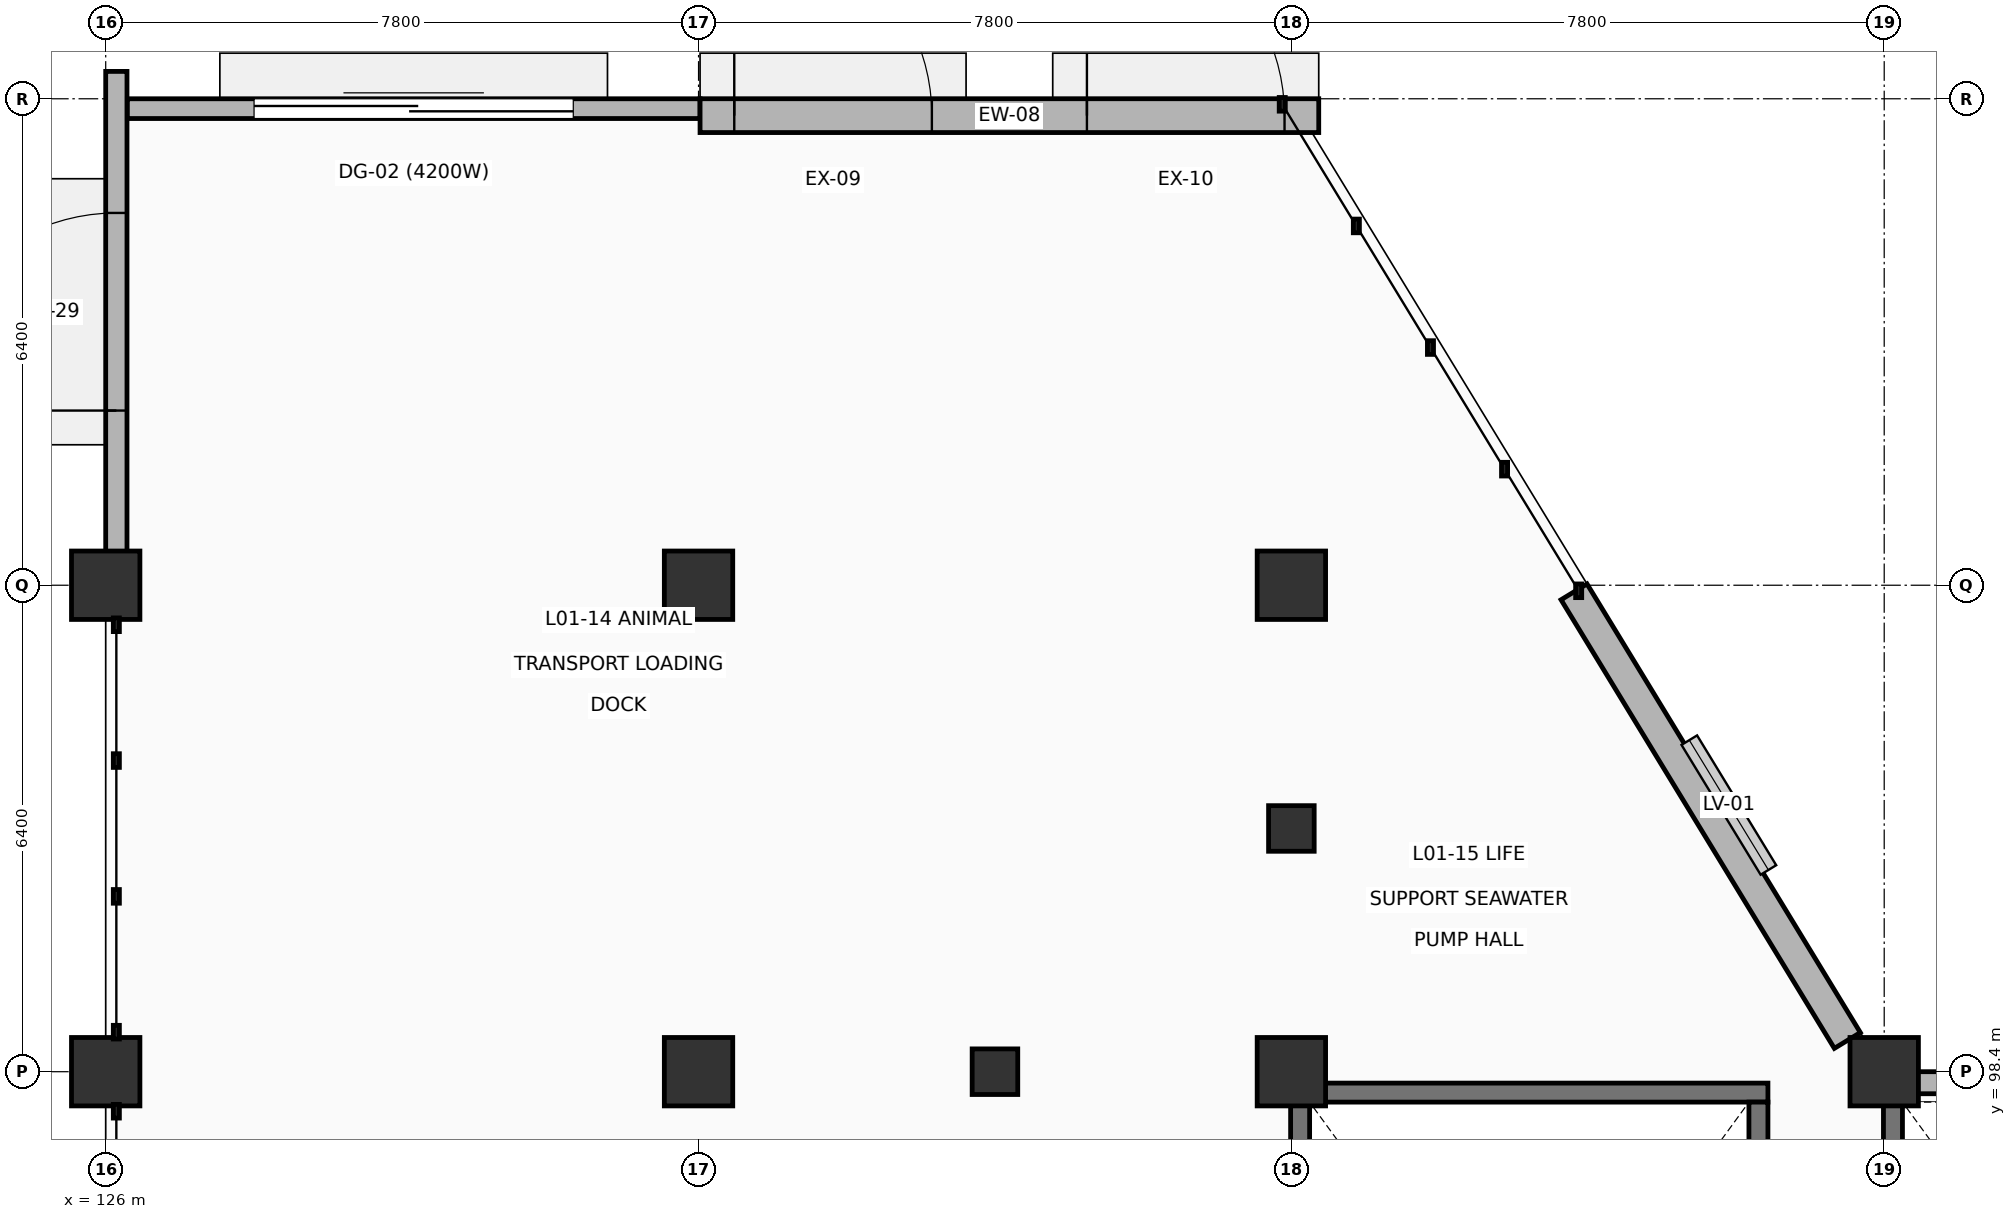
"""IFC4 building model, lengths in metres.
Left out: names, types, materials, properties, quantities, classifications, styles, units other than length and angle.
Written with IfcOpenShell. Run it as: python <this file> out.ifc"""

import sys

from ifc_helpers import new_model, si_unit, direction, frame, frame_2d, origin, origin_2d, place, context, subcontext, project, spatial, rectangle, extrude, element, fill, save


model = new_model("IFC4")
c1 = context("Model", 3, precision=1e-05, world=origin(), true_north=direction((0.0, 1.0)))
c2 = subcontext(c1, "Body", "Model", "MODEL_VIEW")
j1 = project(units=[si_unit("LENGTHUNIT", "METRE"), si_unit("PLANEANGLEUNIT", "RADIAN")], contexts=[c1])
p1 = place(None, origin())
s1 = spatial("IfcSite", under=j1, at=p1, CompositionType="ELEMENT")
p2 = place(p1, origin())
s2 = spatial("IfcBuilding", under=s1, at=p2, CompositionType="ELEMENT")
p3 = place(p2, origin())
s3 = spatial("IfcBuildingStorey", under=s2, at=p3, CompositionType="ELEMENT", Elevation=0.0)
for number, where, z_axis, x_axis in (
    (1, (126.0, 98.4, 0.0), (0.0, 0.0, 1.0), (1.0, 0.0, 0.0)),
    (2, (126.0, 104.8, 0.0), (0.0, 0.0, 1.0), (1.0, 0.0, 0.0)),
):
    element("IfcColumn", number, at=place(p3, frame(where, z_axis=z_axis, x_axis=x_axis)), inside=s3, PredefinedType="COLUMN", context=c2, shape_type="SweptSolid", body=[
        extrude(rectangle(XDim=0.9, YDim=0.9, at=origin_2d()), origin(), (0.0, 0.0, 1.0), 5.1),
    ])
for number, where, z_axis, x_axis in (
    (3, (133.8, 98.4, 0.0), (0.0, 0.0, 1.0), (1.0, 0.0, 0.0)),
    (4, (133.8, 104.8, 0.0), (0.0, 0.0, 1.0), (1.0, 0.0, 0.0)),
    (5, (141.6, 98.4, 0.0), (0.0, 0.0, 1.0), (1.0, 0.0, 0.0)),
    (6, (141.6, 104.8, 0.0), (0.0, 0.0, 1.0), (1.0, 0.0, 0.0)),
    (7, (149.4, 98.4, 0.0), (0.0, 0.0, 1.0), (1.0, 0.0, 0.0)),
):
    element("IfcColumn", number, at=place(p3, frame(where, z_axis=z_axis, x_axis=x_axis)), inside=s3, PredefinedType="COLUMN", context=c2, shape_type="SweptSolid", body=[
        extrude(rectangle(XDim=0.9, YDim=0.9, at=origin_2d()), origin(), (0.0, 0.0, 1.0), 5.4),
    ])
for number, where, z_axis, x_axis in (
    (8, (137.7, 98.4, 0.0), (0.0, 0.0, 1.0), (1.0, 0.0, 0.0)),
    (9, (141.6, 101.6, 0.0), (0.0, 0.0, 1.0), (1.0, 0.0, 0.0)),
):
    element("IfcColumn", number, at=place(p3, frame(where, z_axis=z_axis, x_axis=x_axis)), inside=s3, PredefinedType="COLUMN", context=c2, shape_type="SweptSolid", body=[
        extrude(rectangle(XDim=0.6, YDim=0.6, at=origin_2d()), origin(), (0.0, 0.0, 1.0), 5.4),
    ])
p4 = place(p3, frame((149.835, 98.255, 0.0), z_axis=(0.0, 0.0, 1.0), x_axis=(1.0, 0.0, 0.0)))
e10 = element("IfcWall", 10, at=p4, inside=s3, PredefinedType="SOLIDWALL", context=c2, shape_type="SweptSolid", body=[
    extrude(rectangle(XDim=6.93, YDim=0.29, at=frame_2d((3.465, 0.0))), origin(), (0.0, 0.0, 1.0), 4.325),
])
p5 = place(p3, frame((126.14, 105.235, 0.0), z_axis=(0.0, 0.0, 1.0), x_axis=(0.0, 1.0, 0.0)))
e11 = element("IfcWall", 11, at=p5, inside=s3, PredefinedType="SOLIDWALL", context=c2, shape_type="SweptSolid", body=[
    extrude(rectangle(XDim=6.325, YDim=0.28, at=frame_2d((3.163, 0.0))), origin(), (0.0, 0.0, 1.0), 5.16),
])
p6 = place(p5, frame((1.863, 0.0, 0.0)))
e12 = element("IfcOpeningElement", 12, at=p6, cuts=e11, PredefinedType="OPENING", context=c2, shape_type="SweptSolid", body=[
    extrude(rectangle(XDim=2.6, YDim=2.6, at=frame_2d((1.3, 1.3))), frame((0.0, 0.15, 0.0), z_axis=(0.0, -1.0, 0.0), x_axis=(1.0, 0.0, 0.0)), (0.0, 0.0, 1.0), 0.3),
])
p7 = place(p3, frame((126.285, 111.07, 0.0), z_axis=(0.0, 0.0, 1.0), x_axis=(1.0, 0.0, 0.0)))
e13 = element("IfcWall", 13, at=p7, inside=s3, PredefinedType="SOLIDWALL", context=c2, shape_type="SweptSolid", body=[
    extrude(rectangle(XDim=7.535, YDim=0.26, at=frame_2d((3.768, 0.0))), origin(), (0.0, 0.0, 1.0), 5.16),
])
p8 = place(p7, frame((1.667, 0.0, 0.0)))
e14 = element("IfcOpeningElement", 14, at=p8, cuts=e13, PredefinedType="OPENING", context=c2, shape_type="SweptSolid", body=[
    extrude(rectangle(XDim=4.2, YDim=4.6, at=frame_2d((2.1, 2.3))), frame((0.0, 0.14, 0.0), z_axis=(0.0, -1.0, 0.0), x_axis=(1.0, 0.0, 0.0)), (0.0, 0.0, 1.0), 0.28),
])
p9 = place(p3, frame((133.82, 110.978, 0.0), z_axis=(0.0, 0.0, 1.0), x_axis=(1.0, 0.0, 0.0)))
e15 = element("IfcWall", 15, at=p9, inside=s3, PredefinedType="SOLIDWALL", context=c2, shape_type="SweptSolid", body=[
    extrude(rectangle(XDim=8.14, YDim=0.445, at=frame_2d((4.07, 0.0))), origin(), (0.0, 0.0, 1.0), 5.16),
])
p10 = place(p9, frame((0.45, 0.0, 0.0)))
e16 = element("IfcOpeningElement", 16, at=p10, cuts=e15, PredefinedType="OPENING", context=c2, shape_type="SweptSolid", body=[
    extrude(rectangle(XDim=2.6, YDim=2.6, at=frame_2d((1.3, 1.3))), frame((0.0, 0.232, 0.0), z_axis=(0.0, -1.0, 0.0), x_axis=(1.0, 0.0, 0.0)), (0.0, 0.0, 1.0), 0.465),
])
p11 = place(p9, frame((5.09, 0.0, 0.0)))
e17 = element("IfcOpeningElement", 17, at=p11, cuts=e15, PredefinedType="OPENING", context=c2, shape_type="SweptSolid", body=[
    extrude(rectangle(XDim=2.6, YDim=2.6, at=frame_2d((1.3, 1.3))), frame((0.0, 0.232, 0.0), z_axis=(0.0, -1.0, 0.0), x_axis=(1.0, 0.0, 0.0)), (0.0, 0.0, 1.0), 0.465),
])
p12 = place(p3, frame((145.319, 104.713, 0.0), z_axis=(0.0, 0.0, 1.0), x_axis=(0.520317846081, -0.853972680505, 0.0)))
e18 = element("IfcWall", 18, at=p12, inside=s3, PredefinedType="SOLIDWALL", context=c2, shape_type="SweptSolid", body=[
    extrude(rectangle(XDim=6.911, YDim=0.4, at=frame_2d((3.456, 0.0))), origin(), (0.0, 0.0, 1.0), 5.1),
])
p13 = place(p3, frame((141.59, 98.125, 0.0), z_axis=(0.0, 0.0, 1.0), x_axis=(1.0, 0.0, 0.0)))
e19 = element("IfcWall", 19, at=p13, inside=s3, PredefinedType="SHEAR", context=c2, shape_type="SweptSolid", body=[
    extrude(rectangle(XDim=6.28, YDim=0.25, at=frame_2d((3.14, 0.0))), origin(), (0.0, 0.0, 1.0), 5.1),
])
for number, where, z_axis, x_axis in (
    (20, (141.715, 88.5, 0.0), (0.0, 0.0, 1.0), (0.0, 1.0, 0.0)),
    (21, (147.745, 88.5, 0.0), (0.0, 0.0, 1.0), (0.0, 1.0, 0.0)),
    (22, (149.515, 88.5, 0.0), (0.0, 0.0, 1.0), (0.0, 1.0, 0.0)),
):
    element("IfcWall", number, at=place(p3, frame(where, z_axis=z_axis, x_axis=x_axis)), inside=s3, PredefinedType="SHEAR", context=c2, shape_type="SweptSolid", body=[
        extrude(rectangle(XDim=9.5, YDim=0.25, at=frame_2d((4.75, 0.0))), origin(), (0.0, 0.0, 1.0), 5.1),
    ])
p14 = place(p8, origin())
e23 = element("IfcDoor", 23, at=p14, inside=s3, OperationType="ROLLINGUP", PredefinedType="GATE", context=c2, shape_type="SweptSolid", body=[
    extrude(rectangle(XDim=4.2, YDim=4.6, at=frame_2d((2.1, 2.3))), frame((0.0, 0.025, 0.0), z_axis=(0.0, -1.0, 0.0), x_axis=(1.0, 0.0, 0.0)), (0.0, 0.0, 1.0), 0.05),
])
fill(e14, e23)
p15 = place(p10, origin())
e24 = element("IfcDoor", 24, at=p15, inside=s3, OperationType="DOUBLE_DOOR_SINGLE_SWING", PredefinedType="DOOR", context=c2, shape_type="SweptSolid", body=[
    extrude(rectangle(XDim=2.6, YDim=2.6, at=frame_2d((1.3, 1.3))), frame((0.0, 0.025, 0.0), z_axis=(0.0, -1.0, 0.0), x_axis=(1.0, 0.0, 0.0)), (0.0, 0.0, 1.0), 0.05),
])
fill(e16, e24)
p16 = place(p11, origin())
e25 = element("IfcDoor", 25, at=p16, inside=s3, OperationType="DOUBLE_DOOR_SINGLE_SWING", PredefinedType="DOOR", context=c2, shape_type="SweptSolid", body=[
    extrude(rectangle(XDim=2.6, YDim=2.6, at=frame_2d((1.3, 1.3))), frame((0.0, 0.025, 0.0), z_axis=(0.0, -1.0, 0.0), x_axis=(1.0, 0.0, 0.0)), (0.0, 0.0, 1.0), 0.05),
])
fill(e17, e25)
p17 = place(p6, origin())
e26 = element("IfcDoor", 26, at=p17, inside=s3, OperationType="DOUBLE_DOOR_SINGLE_SWING", PredefinedType="DOOR", context=c2, shape_type="SweptSolid", body=[
    extrude(rectangle(XDim=2.6, YDim=2.6, at=frame_2d((1.3, 1.3))), frame((0.0, 0.025, 0.0), z_axis=(0.0, -1.0, 0.0), x_axis=(1.0, 0.0, 0.0)), (0.0, 0.0, 1.0), 0.05),
])
fill(e12, e26)
save(model, sys.argv[1])
